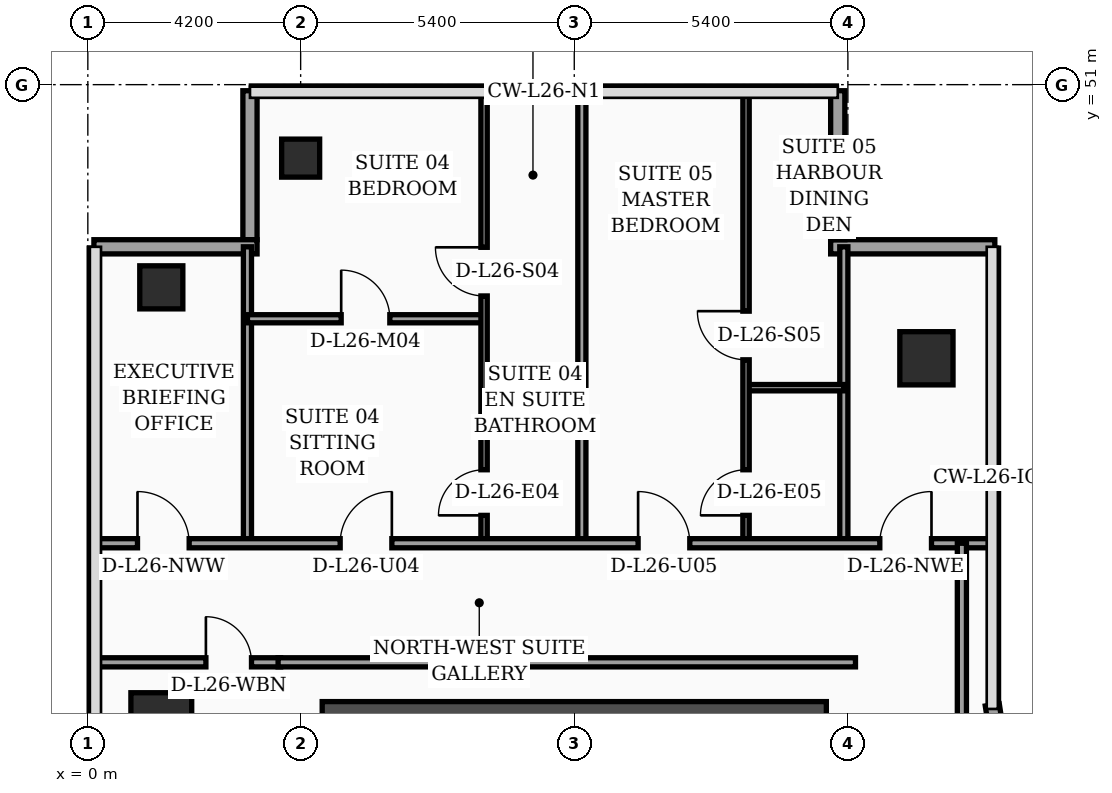
"""IFC4 building model, lengths in metres.
Left out: names, types, materials, properties, quantities, classifications, styles, units other than length and angle.
Written with IfcOpenShell. Run it as: python <this file> out.ifc"""

import sys

from ifc_helpers import new_model, si_unit, direction, frame, frame_2d, origin, origin_2d, place, context, subcontext, project, spatial, rectangle, hollow_rectangle, extrude, element, fill, save


model = new_model("IFC4")
c1 = context("Model", 3, precision=1e-05, world=origin(), true_north=direction((0.0, 1.0)))
c2 = subcontext(c1, "Body", "Model", "MODEL_VIEW")
j1 = project(units=[si_unit("LENGTHUNIT", "METRE"), si_unit("PLANEANGLEUNIT", "RADIAN")], contexts=[c1])
p1 = place(None, origin())
s1 = spatial("IfcSite", under=j1, at=p1, CompositionType="ELEMENT")
p2 = place(p1, origin())
s2 = spatial("IfcBuilding", under=s1, at=p2, CompositionType="ELEMENT")
p3 = place(p2, frame((0.0, 0.0, 108.8)))
s3 = spatial("IfcBuildingStorey", under=s2, at=p3, CompositionType="ELEMENT", Elevation=108.8)
p4 = place(p3, frame((4.625, 38.4, 0.0), z_axis=(0.0, 0.0, 1.0), x_axis=(1.0, 0.0, 0.0)))
e1 = element("IfcWall", 1, at=p4, inside=s3, PredefinedType="SHEAR", context=c2, shape_type="SweptSolid", body=[
    extrude(rectangle(XDim=9.95, YDim=0.85, at=frame_2d((4.975, 0.0))), origin(), (0.0, 0.0, 1.0), 3.56),
])
p5 = place(p3, frame((1.45, 38.4, 0.0), z_axis=(0.0, 0.0, 1.0), x_axis=(1.0, 0.0, 0.0)))
e2 = element("IfcColumn", 2, at=p5, inside=s3, PredefinedType="COLUMN", context=c2, shape_type="SweptSolid", body=[
    extrude(rectangle(XDim=1.2, YDim=1.2, at=origin_2d()), origin(), (0.0, 0.0, 1.0), 3.56),
])
p6 = place(p3, frame((1.45, 47.0, 0.0), z_axis=(0.0, 0.0, 1.0), x_axis=(1.0, 0.0, 0.0)))
e3 = element("IfcColumn", 3, at=p6, inside=s3, PredefinedType="COLUMN", context=c2, shape_type="SweptSolid", body=[
    extrude(hollow_rectangle(XDim=0.85, YDim=0.85, WallThickness=0.036, at=origin_2d()), origin(), (0.0, 0.0, 1.0), 3.56),
])
p7 = place(p3, frame((4.2, 49.55, 0.0), z_axis=(0.0, 0.0, 1.0), x_axis=(1.0, 0.0, 0.0)))
e4 = element("IfcColumn", 4, at=p7, inside=s3, PredefinedType="COLUMN", context=c2, shape_type="SweptSolid", body=[
    extrude(hollow_rectangle(XDim=0.75, YDim=0.75, WallThickness=0.032, at=origin_2d()), origin(), (0.0, 0.0, 1.0), 3.56),
])
p8 = place(p3, frame((16.55, 45.6, 0.0), z_axis=(0.0, 0.0, 1.0), x_axis=(1.0, 0.0, 0.0)))
e5 = element("IfcColumn", 5, at=p8, inside=s3, PredefinedType="COLUMN", context=c2, shape_type="SweptSolid", body=[
    extrude(rectangle(XDim=1.05, YDim=1.05, at=origin_2d()), origin(), (0.0, 0.0, 1.0), 3.56),
])
p9 = place(p3, frame((17.962, 38.03, 0.0), z_axis=(0.0, 0.0, 1.0), x_axis=(-0.15141125477, 0.988470855377, 0.0)))
e6 = element("IfcWall", 6, at=p9, inside=s3, PredefinedType="SOLIDWALL", context=c2, shape_type="SweptSolid", body=[
    extrude(rectangle(XDim=0.739, YDim=0.28, at=frame_2d((0.369, 0.0))), origin(), (0.0, 0.0, 1.0), 3.56),
])
p10 = place(p3, frame((17.9, 47.8, 0.0), z_axis=(0.0, 0.0, 1.0), x_axis=(-1.0, 0.0, 0.0)))
e7 = element("IfcWall", 7, at=p10, inside=s3, PredefinedType="SOLIDWALL", context=c2, shape_type="SweptSolid", body=[
    extrude(rectangle(XDim=3.24, YDim=0.28, at=frame_2d((1.62, 0.0))), origin(), (0.0, 0.0, 1.0), 3.56),
])
p11 = place(p3, frame((14.8, 47.94, 0.0), z_axis=(0.0, 0.0, 1.0), x_axis=(0.0, 1.0, 0.0)))
e8 = element("IfcWall", 8, at=p11, inside=s3, PredefinedType="SOLIDWALL", context=c2, shape_type="SweptSolid", body=[
    extrude(rectangle(XDim=2.94, YDim=0.28, at=frame_2d((1.47, 0.0))), origin(), (0.0, 0.0, 1.0), 3.56),
])
p12 = place(p3, frame((3.2, 50.88, 0.0), z_axis=(0.0, 0.0, 1.0), x_axis=(0.0, -1.0, 0.0)))
e9 = element("IfcWall", 9, at=p12, inside=s3, PredefinedType="SOLIDWALL", context=c2, shape_type="SweptSolid", body=[
    extrude(rectangle(XDim=2.94, YDim=0.28, at=frame_2d((1.47, 0.0))), origin(), (0.0, 0.0, 1.0), 3.04),
])
p13 = place(p3, frame((3.34, 47.8, 0.0), z_axis=(0.0, 0.0, 1.0), x_axis=(-1.0, 0.0, 0.0)))
e10 = element("IfcWall", 10, at=p13, inside=s3, PredefinedType="SOLIDWALL", context=c2, shape_type="SweptSolid", body=[
    extrude(rectangle(XDim=3.22, YDim=0.28, at=frame_2d((1.61, 0.0))), origin(), (0.0, 0.0, 1.0), 3.04),
])
p14 = place(p3, frame((0.08, 39.6, 0.0), z_axis=(0.0, 0.0, 1.0), x_axis=(1.0, 0.0, 0.0)))
e11 = element("IfcWall", 11, at=p14, inside=s3, PredefinedType="PARTITIONING", context=c2, shape_type="SweptSolid", body=[
    extrude(rectangle(XDim=3.725, YDim=0.18, at=frame_2d((1.862, 0.0))), origin(), (0.0, 0.0, 1.0), 2.84),
])
p15 = place(p14, frame((2.25, 0.0, 0.0)))
e12 = element("IfcOpeningElement", 12, at=p15, cuts=e11, PredefinedType="OPENING", context=c2, shape_type="SweptSolid", body=[
    extrude(rectangle(XDim=0.9, YDim=2.15, at=frame_2d((0.45, 1.075))), frame((0.0, 0.1, 0.0), z_axis=(0.0, -1.0, 0.0), x_axis=(1.0, 0.0, 0.0)), (0.0, 0.0, 1.0), 0.2),
])
p16 = place(p3, frame((3.15, 41.95, 0.0), z_axis=(0.0, 0.0, 1.0), x_axis=(0.0, 1.0, 0.0)))
e13 = element("IfcWall", 13, at=p16, inside=s3, PredefinedType="PARTITIONING", context=c2, shape_type="SweptSolid", body=[
    extrude(rectangle(XDim=5.85, YDim=0.16, at=frame_2d((2.925, 0.0))), origin(), (0.0, 0.0, 1.0), 3.14),
])
p17 = place(p3, frame((14.92, 41.95, 0.0), z_axis=(0.0, 0.0, 1.0), x_axis=(0.0, 1.0, 0.0)))
e14 = element("IfcWall", 14, at=p17, inside=s3, PredefinedType="PARTITIONING", context=c2, shape_type="SweptSolid", body=[
    extrude(rectangle(XDim=5.85, YDim=0.16, at=frame_2d((2.925, 0.0))), origin(), (0.0, 0.0, 1.0), 3.04),
])
p18 = place(p3, frame((7.82, 45.02, 0.0), z_axis=(0.0, 0.0, 1.0), x_axis=(1.0, 0.0, 0.0)))
e15 = element("IfcWall", 15, at=p18, inside=s3, PredefinedType="PARTITIONING", context=c2, shape_type="SweptSolid", body=[
    extrude(rectangle(XDim=1.93, YDim=0.125, at=frame_2d((0.965, 0.0))), origin(), (0.0, 0.0, 1.0), 3.56),
])
p19 = place(p3, frame((3.15, 46.38, 0.0), z_axis=(0.0, 0.0, 1.0), x_axis=(1.0, 0.0, 0.0)))
e16 = element("IfcWall", 16, at=p19, inside=s3, PredefinedType="PARTITIONING", context=c2, shape_type="SweptSolid", body=[
    extrude(rectangle(XDim=4.67, YDim=0.16, at=frame_2d((2.335, 0.0))), origin(), (0.0, 0.0, 1.0), 2.84),
])
p20 = place(p19, frame((1.85, 0.0, 0.0)))
e17 = element("IfcOpeningElement", 17, at=p20, cuts=e16, PredefinedType="OPENING", context=c2, shape_type="SweptSolid", body=[
    extrude(rectangle(XDim=0.96, YDim=2.2, at=frame_2d((0.48, 1.1))), frame((0.0, 0.09, 0.0), z_axis=(0.0, -1.0, 0.0), x_axis=(1.0, 0.0, 0.0)), (0.0, 0.0, 1.0), 0.18),
])
p21 = place(p3, frame((7.82, 41.95, 0.0), z_axis=(0.0, 0.0, 1.0), x_axis=(0.0, 1.0, 0.0)))
e18 = element("IfcWall", 18, at=p21, inside=s3, PredefinedType="PARTITIONING", context=c2, shape_type="SweptSolid", body=[
    extrude(rectangle(XDim=8.99, YDim=0.125, at=frame_2d((4.495, 0.0))), origin(), (0.0, 0.0, 1.0), 3.04),
])
p22 = place(p21, frame((0.55, 0.0, 0.0)))
e19 = element("IfcOpeningElement", 19, at=p22, cuts=e18, PredefinedType="OPENING", context=c2, shape_type="SweptSolid", body=[
    extrude(rectangle(XDim=0.9, YDim=2.15, at=frame_2d((0.45, 1.075))), frame((0.0, 0.073, 0.0), z_axis=(0.0, -1.0, 0.0), x_axis=(1.0, 0.0, 0.0)), (0.0, 0.0, 1.0), 0.145),
])
p23 = place(p21, frame((4.88, 0.0, 0.0)))
e20 = element("IfcOpeningElement", 20, at=p23, cuts=e18, PredefinedType="OPENING", context=c2, shape_type="SweptSolid", body=[
    extrude(rectangle(XDim=0.96, YDim=2.2, at=frame_2d((0.48, 1.1))), frame((0.0, 0.073, 0.0), z_axis=(0.0, -1.0, 0.0), x_axis=(1.0, 0.0, 0.0)), (0.0, 0.0, 1.0), 0.145),
])
p24 = place(p3, frame((12.99, 45.02, 0.0), z_axis=(0.0, 0.0, 1.0), x_axis=(1.0, 0.0, 0.0)))
e21 = element("IfcWall", 21, at=p24, inside=s3, PredefinedType="PARTITIONING", context=c2, shape_type="SweptSolid", body=[
    extrude(rectangle(XDim=1.93, YDim=0.125, at=frame_2d((0.965, 0.0))), origin(), (0.0, 0.0, 1.0), 3.56),
])
p25 = place(p3, frame((12.99, 41.95, 0.0), z_axis=(0.0, 0.0, 1.0), x_axis=(0.0, 1.0, 0.0)))
e22 = element("IfcWall", 22, at=p25, inside=s3, PredefinedType="PARTITIONING", context=c2, shape_type="SweptSolid", body=[
    extrude(rectangle(XDim=8.99, YDim=0.125, at=frame_2d((4.495, 0.0))), origin(), (0.0, 0.0, 1.0), 3.04),
])
p26 = place(p25, frame((0.55, 0.0, 0.0)))
e23 = element("IfcOpeningElement", 23, at=p26, cuts=e22, PredefinedType="OPENING", context=c2, shape_type="SweptSolid", body=[
    extrude(rectangle(XDim=0.9, YDim=2.15, at=frame_2d((0.45, 1.075))), frame((0.0, 0.073, 0.0), z_axis=(0.0, -1.0, 0.0), x_axis=(1.0, 0.0, 0.0)), (0.0, 0.0, 1.0), 0.145),
])
p27 = place(p25, frame((3.62, 0.0, 0.0)))
e24 = element("IfcOpeningElement", 24, at=p27, cuts=e22, PredefinedType="OPENING", context=c2, shape_type="SweptSolid", body=[
    extrude(rectangle(XDim=0.96, YDim=2.2, at=frame_2d((0.48, 1.1))), frame((0.0, 0.073, 0.0), z_axis=(0.0, -1.0, 0.0), x_axis=(1.0, 0.0, 0.0)), (0.0, 0.0, 1.0), 0.145),
])
p28 = place(p3, frame((9.75, 41.95, 0.0), z_axis=(0.0, 0.0, 1.0), x_axis=(0.0, 1.0, 0.0)))
e25 = element("IfcWall", 25, at=p28, inside=s3, PredefinedType="PARTITIONING", context=c2, shape_type="SweptSolid", body=[
    extrude(rectangle(XDim=8.99, YDim=0.16, at=frame_2d((4.495, 0.0))), origin(), (0.0, 0.0, 1.0), 3.04),
])
p29 = place(p3, frame((0.08, 41.95, 0.0), z_axis=(0.0, 0.0, 1.0), x_axis=(1.0, 0.0, 0.0)))
e26 = element("IfcWall", 26, at=p29, inside=s3, PredefinedType="PARTITIONING", context=c2, shape_type="SweptSolid", body=[
    extrude(rectangle(XDim=17.77, YDim=0.18, at=frame_2d((8.885, 0.0))), origin(), (0.0, 0.0, 1.0), 2.84),
])
p30 = place(p29, frame((0.9, 0.0, 0.0)))
e27 = element("IfcOpeningElement", 27, at=p30, cuts=e26, PredefinedType="OPENING", context=c2, shape_type="SweptSolid", body=[
    extrude(rectangle(XDim=1.02, YDim=2.2, at=frame_2d((0.51, 1.1))), frame((0.0, 0.1, 0.0), z_axis=(0.0, -1.0, 0.0), x_axis=(1.0, 0.0, 0.0)), (0.0, 0.0, 1.0), 0.2),
])
p31 = place(p29, frame((4.9, 0.0, 0.0)))
e28 = element("IfcOpeningElement", 28, at=p31, cuts=e26, PredefinedType="OPENING", context=c2, shape_type="SweptSolid", body=[
    extrude(rectangle(XDim=1.02, YDim=2.2, at=frame_2d((0.51, 1.1))), frame((0.0, 0.1, 0.0), z_axis=(0.0, -1.0, 0.0), x_axis=(1.0, 0.0, 0.0)), (0.0, 0.0, 1.0), 0.2),
])
p32 = place(p29, frame((10.78, 0.0, 0.0)))
e29 = element("IfcOpeningElement", 29, at=p32, cuts=e26, PredefinedType="OPENING", context=c2, shape_type="SweptSolid", body=[
    extrude(rectangle(XDim=1.02, YDim=2.2, at=frame_2d((0.51, 1.1))), frame((0.0, 0.1, 0.0), z_axis=(0.0, -1.0, 0.0), x_axis=(1.0, 0.0, 0.0)), (0.0, 0.0, 1.0), 0.2),
])
p33 = place(p29, frame((15.55, 0.0, 0.0)))
e30 = element("IfcOpeningElement", 30, at=p33, cuts=e26, PredefinedType="OPENING", context=c2, shape_type="SweptSolid", body=[
    extrude(rectangle(XDim=1.02, YDim=2.2, at=frame_2d((0.51, 1.1))), frame((0.0, 0.1, 0.0), z_axis=(0.0, -1.0, 0.0), x_axis=(1.0, 0.0, 0.0)), (0.0, 0.0, 1.0), 0.2),
])
p34 = place(p3, frame((17.25, 24.3, 0.0), z_axis=(0.0, 0.0, 1.0), x_axis=(0.0, 1.0, 0.0)))
e31 = element("IfcWall", 31, at=p34, inside=s3, PredefinedType="PARTITIONING", context=c2, shape_type="SweptSolid", body=[
    extrude(rectangle(XDim=17.65, YDim=0.18, at=frame_2d((8.825, 0.0))), origin(), (0.0, 0.0, 1.0), 2.84),
])
p35 = place(p3, frame((3.755, 39.6, 0.0), z_axis=(0.0, 0.0, 1.0), x_axis=(1.0, 0.0, 0.0)))
e32 = element("IfcWall", 32, at=p35, inside=s3, PredefinedType="PARTITIONING", context=c2, shape_type="SweptSolid", body=[
    extrude(rectangle(XDim=11.395, YDim=0.18, at=frame_2d((5.698, 0.0))), origin(), (0.0, 0.0, 1.0), 2.84),
])
p36 = place(p15, origin())
e33 = element("IfcDoor", 33, at=p36, inside=s3, OperationType="SINGLE_SWING_LEFT", PredefinedType="DOOR", context=c2, shape_type="SweptSolid", body=[
    extrude(rectangle(XDim=0.9, YDim=2.15, at=frame_2d((0.45, 1.075))), frame((0.0, 0.025, 0.0), z_axis=(0.0, -1.0, 0.0), x_axis=(1.0, 0.0, 0.0)), (0.0, 0.0, 1.0), 0.05),
])
fill(e12, e33)
p37 = place(p20, origin())
e34 = element("IfcDoor", 34, at=p37, inside=s3, OperationType="SINGLE_SWING_LEFT", PredefinedType="DOOR", context=c2, shape_type="SweptSolid", body=[
    extrude(rectangle(XDim=0.96, YDim=2.2, at=frame_2d((0.48, 1.1))), frame((0.0, 0.025, 0.0), z_axis=(0.0, -1.0, 0.0), x_axis=(1.0, 0.0, 0.0)), (0.0, 0.0, 1.0), 0.05),
])
fill(e17, e34)
p38 = place(p22, origin())
e35 = element("IfcDoor", 35, at=p38, inside=s3, OperationType="SINGLE_SWING_LEFT", PredefinedType="DOOR", context=c2, shape_type="SweptSolid", body=[
    extrude(rectangle(XDim=0.9, YDim=2.15, at=frame_2d((0.45, 1.075))), frame((0.0, 0.025, 0.0), z_axis=(0.0, -1.0, 0.0), x_axis=(1.0, 0.0, 0.0)), (0.0, 0.0, 1.0), 0.05),
])
fill(e19, e35)
p39 = place(p23, origin())
e36 = element("IfcDoor", 36, at=p39, inside=s3, OperationType="SINGLE_SWING_RIGHT", PredefinedType="DOOR", context=c2, shape_type="SweptSolid", body=[
    extrude(rectangle(XDim=0.96, YDim=2.2, at=frame_2d((0.48, 1.1))), frame((0.0, 0.025, 0.0), z_axis=(0.0, -1.0, 0.0), x_axis=(1.0, 0.0, 0.0)), (0.0, 0.0, 1.0), 0.05),
])
fill(e20, e36)
p40 = place(p26, origin())
e37 = element("IfcDoor", 37, at=p40, inside=s3, OperationType="SINGLE_SWING_LEFT", PredefinedType="DOOR", context=c2, shape_type="SweptSolid", body=[
    extrude(rectangle(XDim=0.9, YDim=2.15, at=frame_2d((0.45, 1.075))), frame((0.0, 0.025, 0.0), z_axis=(0.0, -1.0, 0.0), x_axis=(1.0, 0.0, 0.0)), (0.0, 0.0, 1.0), 0.05),
])
fill(e23, e37)
p41 = place(p27, origin())
e38 = element("IfcDoor", 38, at=p41, inside=s3, OperationType="SINGLE_SWING_RIGHT", PredefinedType="DOOR", context=c2, shape_type="SweptSolid", body=[
    extrude(rectangle(XDim=0.96, YDim=2.2, at=frame_2d((0.48, 1.1))), frame((0.0, 0.025, 0.0), z_axis=(0.0, -1.0, 0.0), x_axis=(1.0, 0.0, 0.0)), (0.0, 0.0, 1.0), 0.05),
])
fill(e24, e38)
p42 = place(p30, origin())
e39 = element("IfcDoor", 39, at=p42, inside=s3, OperationType="SINGLE_SWING_LEFT", PredefinedType="DOOR", context=c2, shape_type="SweptSolid", body=[
    extrude(rectangle(XDim=1.02, YDim=2.2, at=frame_2d((0.51, 1.1))), frame((0.0, 0.025, 0.0), z_axis=(0.0, -1.0, 0.0), x_axis=(1.0, 0.0, 0.0)), (0.0, 0.0, 1.0), 0.05),
])
fill(e27, e39)
p43 = place(p31, origin())
e40 = element("IfcDoor", 40, at=p43, inside=s3, OperationType="SINGLE_SWING_RIGHT", PredefinedType="DOOR", context=c2, shape_type="SweptSolid", body=[
    extrude(rectangle(XDim=1.02, YDim=2.2, at=frame_2d((0.51, 1.1))), frame((0.0, 0.025, 0.0), z_axis=(0.0, -1.0, 0.0), x_axis=(1.0, 0.0, 0.0)), (0.0, 0.0, 1.0), 0.05),
])
fill(e28, e40)
p44 = place(p32, origin())
e41 = element("IfcDoor", 41, at=p44, inside=s3, OperationType="SINGLE_SWING_LEFT", PredefinedType="DOOR", context=c2, shape_type="SweptSolid", body=[
    extrude(rectangle(XDim=1.02, YDim=2.2, at=frame_2d((0.51, 1.1))), frame((0.0, 0.025, 0.0), z_axis=(0.0, -1.0, 0.0), x_axis=(1.0, 0.0, 0.0)), (0.0, 0.0, 1.0), 0.05),
])
fill(e29, e41)
p45 = place(p33, origin())
e42 = element("IfcDoor", 42, at=p45, inside=s3, OperationType="SINGLE_SWING_RIGHT", PredefinedType="DOOR", context=c2, shape_type="SweptSolid", body=[
    extrude(rectangle(XDim=1.02, YDim=2.2, at=frame_2d((0.51, 1.1))), frame((0.0, 0.025, 0.0), z_axis=(0.0, -1.0, 0.0), x_axis=(1.0, 0.0, 0.0)), (0.0, 0.0, 1.0), 0.05),
])
fill(e30, e42)
save(model, sys.argv[1])
